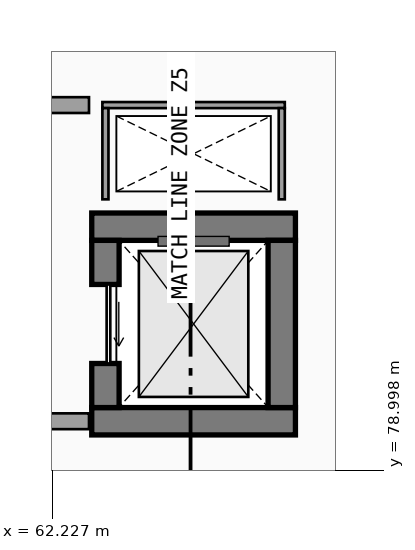
"""IFC4 building model, lengths in metres.
Left out: names, types, materials, properties, quantities, classifications, styles, units other than length and angle.
Written with IfcOpenShell. Run it as: python <this file> out.ifc"""

import sys

from ifc_helpers import new_model, si_unit, direction, frame, frame_2d, origin, place, context, subcontext, project, spatial, rectangle, extrude, element, fill, save


model = new_model("IFC4")
c1 = context("Model", 3, precision=1e-05, world=origin(), true_north=direction((0.0, 1.0)))
c2 = subcontext(c1, "Body", "Model", "MODEL_VIEW")
j1 = project(units=[si_unit("LENGTHUNIT", "METRE"), si_unit("PLANEANGLEUNIT", "RADIAN")], contexts=[c1])
p1 = place(None, origin())
s1 = spatial("IfcSite", under=j1, at=p1, CompositionType="ELEMENT")
p2 = place(p1, origin())
s2 = spatial("IfcBuilding", under=s1, at=p2, CompositionType="ELEMENT")
p3 = place(p2, frame((0.0, 0.0, 4.8)))
s3 = spatial("IfcBuildingStorey", under=s2, at=p3, CompositionType="ELEMENT", Elevation=4.8)
for number, where, z_axis, x_axis in (
    (1, (62.875, 79.8, 0.0), (0.0, 0.0, 1.0), (1.0, 0.0, 0.0)),
    (2, (66.225, 83.0, 0.0), (0.0, 0.0, 1.0), (-1.0, 0.0, 0.0)),
):
    element("IfcWall", number, at=place(p3, frame(where, z_axis=z_axis, x_axis=x_axis)), inside=s3, PredefinedType="SHEAR", context=c2, shape_type="SweptSolid", body=[
        extrude(rectangle(XDim=3.35, YDim=0.45, at=frame_2d((1.675, 0.0))), origin(), (0.0, 0.0, 1.0), 4.52),
    ])
p4 = place(p3, frame((63.1, 82.775, 0.0), z_axis=(0.0, 0.0, 1.0), x_axis=(0.0, -1.0, 0.0)))
e3 = element("IfcWall", 3, at=p4, inside=s3, PredefinedType="SHEAR", context=c2, shape_type="SweptSolid", body=[
    extrude(rectangle(XDim=2.75, YDim=0.45, at=frame_2d((1.375, 0.0))), origin(), (0.0, 0.0, 1.0), 4.52),
])
p5 = place(p4, frame((0.725, 0.0, 0.0), z_axis=(0.0, 0.0, 1.0), x_axis=(1.0, 0.0, 0.0)))
e4 = element("IfcOpeningElement", 4, at=p5, cuts=e3, PredefinedType="OPENING", context=c2, shape_type="SweptSolid", body=[
    extrude(rectangle(XDim=1.3, YDim=2.25, at=frame_2d((0.65, 1.125))), frame((0.0, 0.235, 0.0), z_axis=(0.0, -1.0, 0.0), x_axis=(1.0, 0.0, 0.0)), (0.0, 0.0, 1.0), 0.47),
])
p6 = place(p3, frame((66.0, 80.025, 0.0), z_axis=(0.0, 0.0, 1.0), x_axis=(0.0, 1.0, 0.0)))
e5 = element("IfcWall", 5, at=p6, inside=s3, PredefinedType="SHEAR", context=c2, shape_type="SweptSolid", body=[
    extrude(rectangle(XDim=2.75, YDim=0.45, at=frame_2d((1.375, 0.0))), origin(), (0.0, 0.0, 1.0), 4.52),
])
p7 = place(p3, frame((66.05, 85.0, 0.0), z_axis=(0.0, 0.0, 1.0), x_axis=(-1.0, 0.0, 0.0)))
e6 = element("IfcWall", 6, at=p7, inside=s3, PredefinedType="PARTITIONING", context=c2, shape_type="SweptSolid", body=[
    extrude(rectangle(XDim=3.0, YDim=0.1, at=frame_2d((1.5, 0.0))), origin(), (0.0, 0.0, 1.0), 4.52),
])
for number, where, z_axis, x_axis in (
    (7, (63.1, 84.95, 0.0), (0.0, 0.0, 1.0), (0.0, -1.0, 0.0)),
    (8, (66.0, 83.45, 0.0), (0.0, 0.0, 1.0), (0.0, 1.0, 0.0)),
):
    element("IfcWall", number, at=place(p3, frame(where, z_axis=z_axis, x_axis=x_axis)), inside=s3, PredefinedType="PARTITIONING", context=c2, shape_type="SweptSolid", body=[
        extrude(rectangle(XDim=1.5, YDim=0.1, at=frame_2d((0.75, 0.0))), origin(), (0.0, 0.0, 1.0), 4.52),
    ])
p8 = place(p3, frame((59.07, 79.8, 0.0), z_axis=(0.0, 0.0, 1.0), x_axis=(1.0, 0.0, 0.0)))
e9 = element("IfcWall", 9, at=p8, inside=s3, PredefinedType="SOLIDWALL", context=c2, shape_type="SweptSolid", body=[
    extrude(rectangle(XDim=3.76, YDim=0.26, at=frame_2d((1.88, 0.0))), origin(), (0.0, 0.0, 1.0), 4.52),
])
p9 = place(p3, frame((62.83, 85.0, 0.0), z_axis=(0.0, 0.0, 1.0), x_axis=(-1.0, 0.0, 0.0)))
e10 = element("IfcWall", 10, at=p9, inside=s3, PredefinedType="SOLIDWALL", context=c2, shape_type="SweptSolid", body=[
    extrude(rectangle(XDim=3.76, YDim=0.26, at=frame_2d((1.88, 0.0))), origin(), (0.0, 0.0, 1.0), 4.52),
])
p10 = place(p9, frame((2.805, 0.0, 0.0), z_axis=(0.0, 0.0, 1.0), x_axis=(-1.0, 0.0, 0.0)))
e11 = element("IfcOpeningElement", 11, at=p10, cuts=e10, PredefinedType="OPENING", context=c2, shape_type="SweptSolid", body=[
    extrude(rectangle(XDim=1.85, YDim=2.25, at=frame_2d((0.925, 1.125))), frame((0.0, 0.14, 0.0), z_axis=(0.0, -1.0, 0.0), x_axis=(1.0, 0.0, 0.0)), (0.0, 0.0, 1.0), 0.28),
])
p11 = place(p5, origin())
e12 = element("IfcDoor", 12, at=p11, inside=s3, OperationType="SLIDING_TO_RIGHT", PredefinedType="DOOR", context=c2, shape_type="SweptSolid", body=[
    extrude(rectangle(XDim=1.3, YDim=2.25, at=frame_2d((0.65, 1.125))), frame((0.0, 0.025, 0.0), z_axis=(0.0, -1.0, 0.0), x_axis=(1.0, 0.0, 0.0)), (0.0, 0.0, 1.0), 0.05),
])
fill(e4, e12)
save(model, sys.argv[1])
